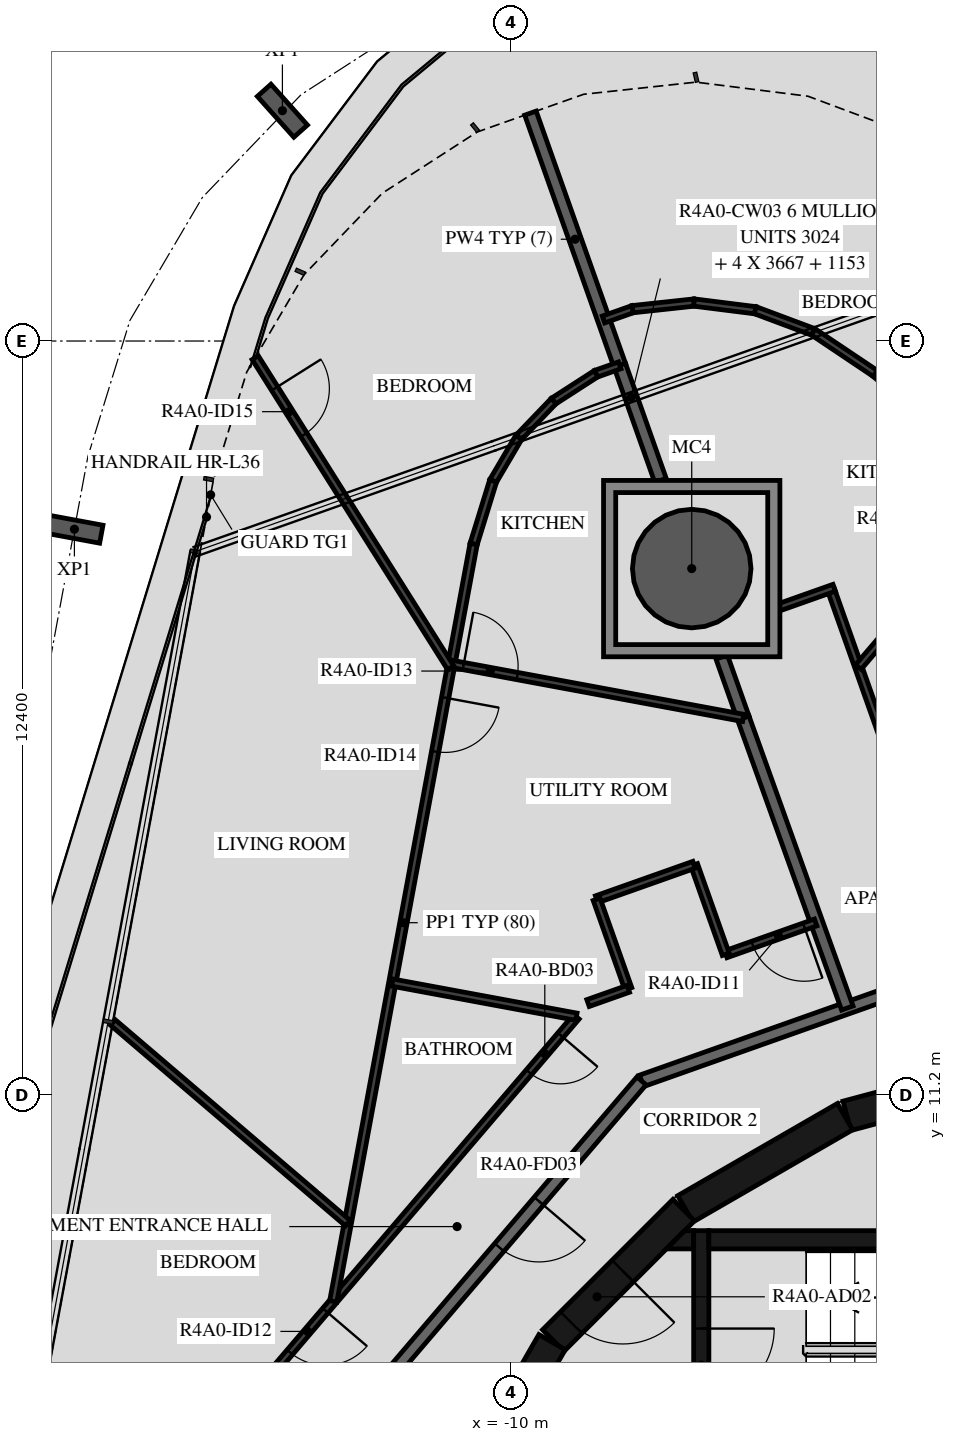
"""IFC4 building model, lengths in metres.
Left out: names, types, materials, properties, quantities, classifications, styles, units other than length and angle.
Written with IfcOpenShell. Run it as: python <this file> out.ifc"""

import sys

from ifc_helpers import new_model, si_unit, direction, frame, frame_2d, origin, origin_2d, place, context, subcontext, project, spatial, polyline, rectangle, hollow_circle, i_section, outline, extrude, element, fill, save


model = new_model("IFC4")
c1 = context("Model", 3, precision=1e-05, world=origin(), true_north=direction((0.0, 1.0)))
c2 = subcontext(c1, "Body", "Model", "MODEL_VIEW")
j1 = project(units=[si_unit("LENGTHUNIT", "METRE"), si_unit("PLANEANGLEUNIT", "RADIAN")], contexts=[c1])
p1 = place(None, origin())
s1 = spatial("IfcSite", under=j1, at=p1, CompositionType="ELEMENT")
p2 = place(p1, origin())
s2 = spatial("IfcBuilding", under=s1, at=p2, CompositionType="ELEMENT")
p3 = place(p2, frame((0.0, 0.0, 151.7)))
s3 = spatial("IfcBuildingStorey", under=s2, at=p3, CompositionType="ELEMENT", Elevation=151.7)
p4 = place(p3, frame((-7.032, 19.858, -0.45), z_axis=(0.0, 0.0, 1.0), x_axis=(1.0, 0.0, 0.0)))
e1 = element("IfcColumn", 1, at=p4, inside=s3, PredefinedType="COLUMN", context=c2, shape_type="SweptSolid", body=[
    extrude(hollow_circle(Radius=0.975, WallThickness=0.045, at=origin_2d()), origin(), (0.0, 0.0, 1.0), 3.57),
])
for number, where, z_axis, x_axis in (
    (2, (-13.763, 27.387, -0.45), (0.0, 0.0, 1.0), (0.746, 0.666, 0.0)),
    (3, (-17.184, 20.505, -0.45), (0.0, 0.0, 1.0), (0.182, 0.983, 0.0)),
):
    element("IfcColumn", number, at=place(p3, frame(where, z_axis=z_axis, x_axis=x_axis)), inside=s3, PredefinedType="COLUMN", context=c2, shape_type="SweptSolid", body=[
        extrude(i_section(OverallWidth=0.3, OverallDepth=0.9, WebThickness=0.019, FlangeThickness=0.035, FilletRadius=0.03, at=origin_2d()), origin(), (0.0, 0.0, 1.0), 3.57),
    ])
for number, where, z_axis, x_axis in (
    (4, (-1.55, 11.643, 0.0), (0.0, 0.0, 1.0), (-0.966, -0.259, 0.0)),
    (5, (-4.51, 10.845, 0.0), (0.0, 0.0, 1.0), (-0.866, -0.5, 0.0)),
):
    element("IfcWall", number, at=place(p3, frame(where, z_axis=z_axis, x_axis=x_axis)), inside=s3, PredefinedType="SHEAR", context=c2, shape_type="SweptSolid", body=[
        extrude(rectangle(XDim=3.033, YDim=0.5, at=frame_2d((1.516, 0.0))), origin(), (0.0, 0.0, 1.0), 3.12),
    ])
p5 = place(p3, frame((-7.164, 9.308, 0.0), z_axis=(0.0, 0.0, 1.0), x_axis=(-0.707106781187, -0.707106781187, 0.0)))
e6 = element("IfcWall", 6, at=p5, inside=s3, PredefinedType="SHEAR", context=c2, shape_type="SweptSolid", body=[
    extrude(rectangle(XDim=3.032, YDim=0.5, at=frame_2d((1.516, 0.0))), origin(), (0.0, 0.0, 1.0), 3.12),
])
p6 = place(p5, frame((1.416, 0.0, 0.0)))
e7 = element("IfcOpeningElement", 7, at=p6, cuts=e6, PredefinedType="OPENING", context=c2, shape_type="SweptSolid", body=[
    extrude(rectangle(XDim=1.2, YDim=2.1, at=frame_2d((0.6, 1.05))), frame((0.0, 0.26, 0.0), z_axis=(0.0, -1.0, 0.0), x_axis=(1.0, 0.0, 0.0)), (0.0, 0.0, 1.0), 0.52),
])
p7 = place(p3, frame((-9.329, 7.137, 0.0), z_axis=(0.0, 0.0, 1.0), x_axis=(-0.500087131594, -0.865975092491, 0.0)))
e8 = element("IfcWall", 8, at=p7, inside=s3, PredefinedType="SHEAR", context=c2, shape_type="SweptSolid", body=[
    extrude(rectangle(XDim=3.033, YDim=0.5, at=frame_2d((1.516, 0.0))), origin(), (0.0, 0.0, 1.0), 3.12),
])
p8 = place(p3, frame((-6.75, 8.82, 0.0), z_axis=(0.0, 0.0, 1.0), x_axis=(1.0, 0.0, 0.0)))
e9 = element("IfcWall", 9, at=p8, inside=s3, PredefinedType="SHEAR", context=c2, shape_type="SweptSolid", body=[
    extrude(rectangle(XDim=6.75, YDim=0.3, at=frame_2d((3.375, 0.0))), origin(), (0.0, 0.0, 1.0), 3.12),
])
p9 = place(p3, frame((-6.875, 8.97, 0.0), z_axis=(0.0, 0.0, 1.0), x_axis=(0.0, -1.0, 0.0)))
e10 = element("IfcWall", 10, at=p9, inside=s3, PredefinedType="SHEAR", context=c2, shape_type="SweptSolid", body=[
    extrude(rectangle(XDim=3.92, YDim=0.25, at=frame_2d((1.96, 0.0))), origin(), (0.0, 0.0, 1.0), 3.12),
])
p10 = place(p9, frame((1.61, 0.0, 0.0)))
e11 = element("IfcOpeningElement", 11, at=p10, cuts=e10, PredefinedType="OPENING", context=c2, shape_type="SweptSolid", body=[
    extrude(rectangle(XDim=1.2, YDim=2.1, at=frame_2d((0.6, 1.05))), frame((0.0, 0.135, 0.0), z_axis=(0.0, -1.0, 0.0), x_axis=(1.0, 0.0, 0.0)), (0.0, 0.0, 1.0), 0.27),
])
p11 = place(p3, origin())
e12 = element("IfcWall", 12, at=p11, inside=s3, PredefinedType="SHEAR", context=c2, shape_type="SweptSolid", body=[
    extrude(outline(polyline([(-7.148, 8.97), (-7.0, 8.97), (-7.0, 8.67), (-7.448, 8.67), (-7.148, 8.97)])), origin(), (0.0, 0.0, 1.0), 3.12),
])
p12 = place(p3, frame((-2.359, 13.38, 0.0), z_axis=(0.0, 0.0, 1.0), x_axis=(-0.942647529236, -0.333789807551, 0.0)))
e13 = element("IfcWall", 13, at=p12, inside=s3, PredefinedType="STANDARD", context=c2, shape_type="SweptSolid", body=[
    extrude(rectangle(XDim=5.833, YDim=0.2, at=frame_2d((2.917, 0.0))), origin(), (0.0, 0.0, 1.0), 3.12),
])
p13 = place(p3, frame((-7.858, 11.433, 0.0), z_axis=(0.0, 0.0, 1.0), x_axis=(-0.649440801937, -0.760412154545, 0.0)))
e14 = element("IfcWall", 14, at=p13, inside=s3, PredefinedType="STANDARD", context=c2, shape_type="SweptSolid", body=[
    extrude(rectangle(XDim=7.181, YDim=0.2, at=frame_2d((3.59, 0.0))), origin(), (0.0, 0.0, 1.0), 3.12),
])
p14 = place(p13, frame((2.6, 0.0, 0.0)))
e15 = element("IfcOpeningElement", 15, at=p14, cuts=e14, PredefinedType="OPENING", context=c2, shape_type="SweptSolid", body=[
    extrude(rectangle(XDim=1.0, YDim=2.1, at=frame_2d((0.5, 1.05))), frame((0.0, 0.11, 0.0), z_axis=(0.0, -1.0, 0.0), x_axis=(1.0, 0.0, 0.0)), (0.0, 0.0, 1.0), 0.22),
])
p15 = place(p3, frame((-6.185, 17.402, 0.0), z_axis=(0.0, 0.0, 1.0), x_axis=(0.337736730281, -0.941240618024, 0.0)))
e16 = element("IfcWall", 16, at=p15, inside=s3, PredefinedType="STANDARD", context=c2, shape_type="SweptSolid", body=[
    extrude(rectangle(XDim=5.068, YDim=0.2, at=frame_2d((2.534, 0.0))), origin(), (0.0, 0.0, 1.0), 3.12),
])
p16 = place(p3, frame((-6.539, 18.403, 0.0), z_axis=(0.0, 0.0, 1.0), x_axis=(0.333625806098, -0.942705585804, 0.0)))
e17 = element("IfcWall", 17, at=p16, inside=s3, PredefinedType="STANDARD", context=c2, shape_type="SweptSolid", body=[
    extrude(rectangle(XDim=1.062, YDim=0.2, at=frame_2d((0.531, 0.0))), origin(), (0.0, 0.0, 1.0), 3.12),
])
p17 = place(p3, frame((-9.684, 27.348, 0.0), z_axis=(0.0, 0.0, 1.0), x_axis=(0.333818381408, -0.942637410797, 0.0)))
e18 = element("IfcWall", 18, at=p17, inside=s3, PredefinedType="STANDARD", context=c2, shape_type="SweptSolid", body=[
    extrude(rectangle(XDim=4.4, YDim=0.2, at=frame_2d((2.2, 0.0))), origin(), (0.0, 0.0, 1.0), 3.12),
])
p18 = place(p3, frame((-8.216, 23.2, 0.0), z_axis=(0.0, 0.0, 1.0), x_axis=(0.333793117913, -0.942646357036, 0.0)))
e19 = element("IfcWall", 19, at=p18, inside=s3, PredefinedType="STANDARD", context=c2, shape_type="SweptSolid", body=[
    extrude(rectangle(XDim=2.008, YDim=0.2, at=frame_2d((1.004, 0.0))), origin(), (0.0, 0.0, 1.0), 3.12),
])
p19 = place(p3, frame((8.702, 12.206, 0.0), z_axis=(0.0, 0.0, 1.0), x_axis=(-0.760401313718, 0.649453494945, 0.0)))
e20 = element("IfcWall", 20, at=p19, inside=s3, PredefinedType="PARTITIONING", context=c2, shape_type="SweptSolid", body=[
    extrude(rectangle(XDim=16.724, YDim=0.12, at=frame_2d((8.362, 0.0))), origin(), (0.0, 0.0, 1.0), 3.12),
])
p20 = place(p19, frame((0.2, 0.0, 0.0)))
e21 = element("IfcOpeningElement", 21, at=p20, cuts=e20, PredefinedType="OPENING", context=c2, shape_type="SweptSolid", body=[
    extrude(rectangle(XDim=0.9, YDim=2.1, at=frame_2d((0.45, 1.05))), frame((0.0, 0.07, 0.0), z_axis=(0.0, -1.0, 0.0), x_axis=(1.0, 0.0, 0.0)), (0.0, 0.0, 1.0), 0.14),
])
p21 = place(p19, frame((7.099, 0.0, 0.0)))
e22 = element("IfcOpeningElement", 22, at=p21, cuts=e20, PredefinedType="OPENING", context=c2, shape_type="SweptSolid", body=[
    extrude(rectangle(XDim=0.9, YDim=2.1, at=frame_2d((0.45, 1.05))), frame((0.0, 0.07, 0.0), z_axis=(0.0, -1.0, 0.0), x_axis=(1.0, 0.0, 0.0)), (0.0, 0.0, 1.0), 0.14),
])
p22 = place(p3, frame((-3.048, 14.727, 0.0), z_axis=(0.0, 0.0, 1.0), x_axis=(-0.333811603187, 0.942639811157, 0.0)))
e23 = element("IfcWall", 23, at=p22, inside=s3, PredefinedType="PARTITIONING", context=c2, shape_type="SweptSolid", body=[
    extrude(rectangle(XDim=5.087, YDim=0.12, at=frame_2d((2.543, 0.0))), origin(), (0.0, 0.0, 1.0), 3.12),
])
p23 = place(p3, frame((-4.689, 19.542, 0.0), z_axis=(0.0, 0.0, 1.0), x_axis=(-0.942661851862, -0.33374935662, 0.0)))
e24 = element("IfcWall", 24, at=p23, inside=s3, PredefinedType="PARTITIONING", context=c2, shape_type="SweptSolid", body=[
    extrude(rectangle(XDim=1.017, YDim=0.12, at=frame_2d((0.508, 0.0))), origin(), (0.0, 0.0, 1.0), 3.12),
])
p24 = place(p3, frame((-1.79, 21.167, 0.0), z_axis=(0.0, 0.0, 1.0), x_axis=(-0.649427819186, -0.760423242456, 0.0)))
e25 = element("IfcWall", 25, at=p24, inside=s3, PredefinedType="PARTITIONING", context=c2, shape_type="SweptSolid", body=[
    extrude(rectangle(XDim=3.851, YDim=0.12, at=frame_2d((1.926, 0.0))), origin(), (0.0, 0.0, 1.0), 3.12),
])
p25 = place(p24, frame((0.2, 0.0, 0.0)))
e26 = element("IfcOpeningElement", 26, at=p25, cuts=e25, PredefinedType="OPENING", context=c2, shape_type="SweptSolid", body=[
    extrude(rectangle(XDim=0.9, YDim=2.1, at=frame_2d((0.45, 1.05))), frame((0.0, 0.07, 0.0), z_axis=(0.0, -1.0, 0.0), x_axis=(1.0, 0.0, 0.0)), (0.0, 0.0, 1.0), 0.14),
])
p26 = place(p3, frame((-8.483, 23.954, 0.0), z_axis=(0.0, 0.0, 1.0), x_axis=(0.942554725445, 0.334051776738, 0.0)))
e27 = element("IfcWall", 27, at=p26, inside=s3, PredefinedType="PARTITIONING", context=c2, shape_type="SweptSolid", body=[
    extrude(rectangle(XDim=0.508, YDim=0.12, at=frame_2d((0.254, 0.0))), origin(), (0.0, 0.0, 1.0), 3.12),
])
p27 = place(p3, frame((-8.004, 24.124, 0.0), z_axis=(0.0, 0.0, 1.0), x_axis=(0.994216064839, 0.107398400431, 0.0)))
e28 = element("IfcWall", 28, at=p27, inside=s3, PredefinedType="PARTITIONING", context=c2, shape_type="SweptSolid", body=[
    extrude(rectangle(XDim=1.016, YDim=0.12, at=frame_2d((0.508, 0.0))), origin(), (0.0, 0.0, 1.0), 3.12),
])
p28 = place(p3, frame((-6.994, 24.233, 0.0), z_axis=(0.0, 0.0, 1.0), x_axis=(0.992188875952, -0.124744676991, 0.0)))
e29 = element("IfcWall", 29, at=p28, inside=s3, PredefinedType="PARTITIONING", context=c2, shape_type="SweptSolid", body=[
    extrude(rectangle(XDim=1.016, YDim=0.12, at=frame_2d((0.508, 0.0))), origin(), (0.0, 0.0, 1.0), 3.12),
])
p29 = place(p3, frame((-5.986, 24.106, 0.0), z_axis=(0.0, 0.0, 1.0), x_axis=(0.936625084254, -0.350333343469, 0.0)))
e30 = element("IfcWall", 30, at=p29, inside=s3, PredefinedType="PARTITIONING", context=c2, shape_type="SweptSolid", body=[
    extrude(rectangle(XDim=1.016, YDim=0.12, at=frame_2d((0.508, 0.0))), origin(), (0.0, 0.0, 1.0), 3.12),
])
p30 = place(p3, frame((-5.034, 23.75, 0.0), z_axis=(0.0, 0.0, 1.0), x_axis=(0.83070096574, -0.556718874764, 0.0)))
e31 = element("IfcWall", 31, at=p30, inside=s3, PredefinedType="PARTITIONING", context=c2, shape_type="SweptSolid", body=[
    extrude(rectangle(XDim=1.227, YDim=0.12, at=frame_2d((0.614, 0.0))), origin(), (0.0, 0.0, 1.0), 3.12),
])
p31 = place(p3, frame((-4.993, 14.038, 0.0), z_axis=(0.0, 0.0, 1.0), x_axis=(-0.942685371668, -0.333682918418, 0.0)))
e32 = element("IfcWall", 32, at=p31, inside=s3, PredefinedType="PARTITIONING", context=c2, shape_type="SweptSolid", body=[
    extrude(rectangle(XDim=1.569, YDim=0.12, at=frame_2d((0.784, 0.0))), origin(), (0.0, 0.0, 1.0), 3.12),
])
p32 = place(p31, frame((0.2, 0.0, 0.0)))
e33 = element("IfcOpeningElement", 33, at=p32, cuts=e32, PredefinedType="OPENING", context=c2, shape_type="SweptSolid", body=[
    extrude(rectangle(XDim=0.9, YDim=2.1, at=frame_2d((0.45, 1.05))), frame((0.0, 0.07, 0.0), z_axis=(0.0, -1.0, 0.0), x_axis=(1.0, 0.0, 0.0)), (0.0, 0.0, 1.0), 0.14),
])
p33 = place(p3, frame((-6.472, 13.515, 0.0), z_axis=(0.0, 0.0, 1.0), x_axis=(-0.333809516424, 0.942640550127, 0.0)))
e34 = element("IfcWall", 34, at=p33, inside=s3, PredefinedType="PARTITIONING", context=c2, shape_type="SweptSolid", body=[
    extrude(rectangle(XDim=1.562, YDim=0.12, at=frame_2d((0.781, 0.0))), origin(), (0.0, 0.0, 1.0), 3.12),
])
p34 = place(p3, frame((-6.993, 14.987, 0.0), z_axis=(0.0, 0.0, 1.0), x_axis=(-0.942599915297, -0.33392424243, 0.0)))
e35 = element("IfcWall", 35, at=p34, inside=s3, PredefinedType="PARTITIONING", context=c2, shape_type="SweptSolid", body=[
    extrude(rectangle(XDim=1.7, YDim=0.12, at=frame_2d((0.85, 0.0))), origin(), (0.0, 0.0, 1.0), 3.12),
])
p35 = place(p3, frame((-8.596, 14.419, 0.0), z_axis=(0.0, 0.0, 1.0), x_axis=(0.333670576497, -0.942689740254, 0.0)))
e36 = element("IfcWall", 36, at=p35, inside=s3, PredefinedType="PARTITIONING", context=c2, shape_type="SweptSolid", body=[
    extrude(rectangle(XDim=1.562, YDim=0.12, at=frame_2d((0.781, 0.0))), origin(), (0.0, 0.0, 1.0), 3.12),
])
p36 = place(p3, frame((-8.075, 12.947, 0.0), z_axis=(0.0, 0.0, 1.0), x_axis=(-0.942649994227, -0.33378284615, 0.0)))
e37 = element("IfcWall", 37, at=p36, inside=s3, PredefinedType="PARTITIONING", context=c2, shape_type="SweptSolid", body=[
    extrude(rectangle(XDim=0.703, YDim=0.12, at=frame_2d((0.352, 0.0))), origin(), (0.0, 0.0, 1.0), 3.12),
])
p37 = place(p3, frame((-8.929, 12.488, 0.0), z_axis=(0.0, 0.0, 1.0), x_axis=(-0.64944646045, -0.760407321775, 0.0)))
e38 = element("IfcWall", 38, at=p37, inside=s3, PredefinedType="PARTITIONING", context=c2, shape_type="SweptSolid", body=[
    extrude(rectangle(XDim=7.69, YDim=0.12, at=frame_2d((3.845, 0.0))), origin(), (0.0, 0.0, 1.0), 3.12),
])
p38 = place(p37, frame((0.4, 0.0, 0.0)))
e39 = element("IfcOpeningElement", 39, at=p38, cuts=e38, PredefinedType="OPENING", context=c2, shape_type="SweptSolid", body=[
    extrude(rectangle(XDim=0.8, YDim=2.1, at=frame_2d((0.4, 1.05))), frame((0.0, 0.07, 0.0), z_axis=(0.0, -1.0, 0.0), x_axis=(1.0, 0.0, 0.0)), (0.0, 0.0, 1.0), 0.14),
])
p39 = place(p37, frame((6.356, 0.0, 0.0)))
e40 = element("IfcOpeningElement", 40, at=p39, cuts=e38, PredefinedType="OPENING", context=c2, shape_type="SweptSolid", body=[
    extrude(rectangle(XDim=0.9, YDim=2.1, at=frame_2d((0.45, 1.05))), frame((0.0, 0.07, 0.0), z_axis=(0.0, -1.0, 0.0), x_axis=(1.0, 0.0, 0.0)), (0.0, 0.0, 1.0), 0.14),
])
p40 = place(p3, frame((-8.216, 23.2, 0.0), z_axis=(0.0, 0.0, 1.0), x_axis=(-0.942565413363, -0.33402161836, 0.0)))
e41 = element("IfcWall", 41, at=p40, inside=s3, PredefinedType="PARTITIONING", context=c2, shape_type="SweptSolid", body=[
    extrude(rectangle(XDim=0.414, YDim=0.12, at=frame_2d((0.207, 0.0))), origin(), (0.0, 0.0, 1.0), 3.12),
])
for number, where, z_axis, x_axis in (
    (42, (-8.606, 23.062, 0.0), (0.0, 0.0, 1.0), (-0.84, -0.542, 0.0)),
    (43, (-9.303, 22.612, 0.0), (0.0, 0.0, 1.0), (-0.693, -0.721, 0.0)),
    (44, (-9.877, 22.014, 0.0), (0.0, 0.0, 1.0), (-0.508, -0.861, 0.0)),
):
    element("IfcWall", number, at=place(p3, frame(where, z_axis=z_axis, x_axis=x_axis)), inside=s3, PredefinedType="PARTITIONING", context=c2, shape_type="SweptSolid", body=[
        extrude(rectangle(XDim=0.829, YDim=0.12, at=frame_2d((0.415, 0.0))), origin(), (0.0, 0.0, 1.0), 3.12),
    ])
p41 = place(p3, frame((-10.298, 21.3, 0.0), z_axis=(0.0, 0.0, 1.0), x_axis=(-0.295127342945, -0.955457927617, 0.0)))
e45 = element("IfcWall", 45, at=p41, inside=s3, PredefinedType="PARTITIONING", context=c2, shape_type="SweptSolid", body=[
    extrude(rectangle(XDim=1.087, YDim=0.12, at=frame_2d((0.543, 0.0))), origin(), (0.0, 0.0, 1.0), 3.12),
])
p42 = place(p3, frame((-10.618, 20.262, 0.0), z_axis=(0.0, 0.0, 1.0), x_axis=(-0.182222468274, -0.983257327487, 0.0)))
e46 = element("IfcWall", 46, at=p42, inside=s3, PredefinedType="PARTITIONING", context=c2, shape_type="SweptSolid", body=[
    extrude(rectangle(XDim=12.667, YDim=0.12, at=frame_2d((6.333, 0.0))), origin(), (0.0, 0.0, 1.0), 3.12),
])
p43 = place(p42, frame((2.57, 0.0, 0.0)))
e47 = element("IfcOpeningElement", 47, at=p43, cuts=e46, PredefinedType="OPENING", context=c2, shape_type="SweptSolid", body=[
    extrude(rectangle(XDim=0.9, YDim=2.1, at=frame_2d((0.45, 1.05))), frame((0.0, 0.07, 0.0), z_axis=(0.0, -1.0, 0.0), x_axis=(1.0, 0.0, 0.0)), (0.0, 0.0, 1.0), 0.14),
])
p44 = place(p3, frame((-10.984, 18.291, 0.0), z_axis=(0.0, 0.0, 1.0), x_axis=(0.98324782266, -0.182273748068, 0.0)))
e48 = element("IfcWall", 48, at=p44, inside=s3, PredefinedType="PARTITIONING", context=c2, shape_type="SweptSolid", body=[
    extrude(rectangle(XDim=4.881, YDim=0.12, at=frame_2d((2.44, 0.0))), origin(), (0.0, 0.0, 1.0), 3.12),
])
p45 = place(p44, frame((0.2, 0.0, 0.0)))
e49 = element("IfcOpeningElement", 49, at=p45, cuts=e48, PredefinedType="OPENING", context=c2, shape_type="SweptSolid", body=[
    extrude(rectangle(XDim=0.9, YDim=2.1, at=frame_2d((0.45, 1.05))), frame((0.0, 0.07, 0.0), z_axis=(0.0, -1.0, 0.0), x_axis=(1.0, 0.0, 0.0)), (0.0, 0.0, 1.0), 0.14),
])
p46 = place(p3, frame((-14.211, 23.326, 0.0), z_axis=(0.0, 0.0, 1.0), x_axis=(0.533278244906, -0.845939899467, 0.0)))
e50 = element("IfcWall", 50, at=p46, inside=s3, PredefinedType="PARTITIONING", context=c2, shape_type="SweptSolid", body=[
    extrude(rectangle(XDim=6.029, YDim=0.12, at=frame_2d((3.014, 0.0))), origin(), (0.0, 0.0, 1.0), 3.12),
])
p47 = place(p46, frame((0.6, 0.0, 0.0)))
e51 = element("IfcOpeningElement", 51, at=p47, cuts=e50, PredefinedType="OPENING", context=c2, shape_type="SweptSolid", body=[
    extrude(rectangle(XDim=0.9, YDim=2.1, at=frame_2d((0.45, 1.05))), frame((0.0, 0.07, 0.0), z_axis=(0.0, -1.0, 0.0), x_axis=(1.0, 0.0, 0.0)), (0.0, 0.0, 1.0), 0.14),
])
p48 = place(p3, frame((-11.955, 13.049, 0.0), z_axis=(0.0, 0.0, 1.0), x_axis=(0.983247271586, -0.182276720725, 0.0)))
e52 = element("IfcWall", 52, at=p48, inside=s3, PredefinedType="PARTITIONING", context=c2, shape_type="SweptSolid", body=[
    extrude(rectangle(XDim=3.078, YDim=0.12, at=frame_2d((1.539, 0.0))), origin(), (0.0, 0.0, 1.0), 3.12),
])
p49 = place(p3, frame((-16.552, 12.394, 0.0), z_axis=(0.0, 0.0, 1.0), x_axis=(0.760425586578, -0.649425074414, 0.0)))
e53 = element("IfcWall", 53, at=p49, inside=s3, PredefinedType="PARTITIONING", context=c2, shape_type="SweptSolid", body=[
    extrude(rectangle(XDim=5.081, YDim=0.12, at=frame_2d((2.541, 0.0))), origin(), (0.0, 0.0, 1.0), 3.12),
])
p50 = place(p3, origin())
e54 = element("IfcWall", 54, at=p50, inside=s3, PredefinedType="STANDARD", context=c2, shape_type="SweptSolid", body=[
    extrude(outline(polyline([(-5.582, 21.308), (-5.582, 18.408), (-8.482, 18.408), (-8.482, 21.308), (-5.582, 21.308)]), holes=[polyline([(-8.282, 18.608), (-5.782, 18.608), (-5.782, 21.108), (-8.282, 21.108), (-8.282, 18.608)])]), origin(), (0.0, 0.0, 1.0), 3.12),
])
p51 = place(p10, origin())
e55 = element("IfcDoor", 55, at=p51, inside=s3, OperationType="SINGLE_SWING_LEFT", PredefinedType="DOOR", context=c2, shape_type="SweptSolid", body=[
    extrude(rectangle(XDim=1.2, YDim=2.1, at=frame_2d((0.6, 1.05))), frame((0.0, 0.025, 0.0), z_axis=(0.0, -1.0, 0.0), x_axis=(1.0, 0.0, 0.0)), (0.0, 0.0, 1.0), 0.05),
])
fill(e11, e55)
p52 = place(p6, origin())
e56 = element("IfcDoor", 56, at=p52, inside=s3, OperationType="SINGLE_SWING_RIGHT", PredefinedType="DOOR", context=c2, shape_type="SweptSolid", body=[
    extrude(rectangle(XDim=1.2, YDim=2.1, at=frame_2d((0.6, 1.05))), frame((0.0, 0.025, 0.0), z_axis=(0.0, -1.0, 0.0), x_axis=(1.0, 0.0, 0.0)), (0.0, 0.0, 1.0), 0.05),
])
fill(e7, e56)
p53 = place(p14, origin())
e57 = element("IfcDoor", 57, at=p53, inside=s3, OperationType="SINGLE_SWING_LEFT", PredefinedType="DOOR", context=c2, shape_type="SweptSolid", body=[
    extrude(rectangle(XDim=1.0, YDim=2.1, at=frame_2d((0.5, 1.05))), frame((0.0, 0.025, 0.0), z_axis=(0.0, -1.0, 0.0), x_axis=(1.0, 0.0, 0.0)), (0.0, 0.0, 1.0), 0.05),
])
fill(e15, e57)
p54 = place(p32, origin())
e58 = element("IfcDoor", 58, at=p54, inside=s3, OperationType="SINGLE_SWING_LEFT", PredefinedType="DOOR", context=c2, shape_type="SweptSolid", body=[
    extrude(rectangle(XDim=0.9, YDim=2.1, at=frame_2d((0.45, 1.05))), frame((0.0, 0.025, 0.0), z_axis=(0.0, -1.0, 0.0), x_axis=(1.0, 0.0, 0.0)), (0.0, 0.0, 1.0), 0.05),
])
fill(e33, e58)
p55 = place(p38, origin())
e59 = element("IfcDoor", 59, at=p55, inside=s3, OperationType="SINGLE_SWING_LEFT", PredefinedType="DOOR", context=c2, shape_type="SweptSolid", body=[
    extrude(rectangle(XDim=0.8, YDim=2.1, at=frame_2d((0.4, 1.05))), frame((0.0, 0.025, 0.0), z_axis=(0.0, -1.0, 0.0), x_axis=(1.0, 0.0, 0.0)), (0.0, 0.0, 1.0), 0.05),
])
fill(e39, e59)
p56 = place(p39, origin())
e60 = element("IfcDoor", 60, at=p56, inside=s3, OperationType="SINGLE_SWING_LEFT", PredefinedType="DOOR", context=c2, shape_type="SweptSolid", body=[
    extrude(rectangle(XDim=0.9, YDim=2.1, at=frame_2d((0.45, 1.05))), frame((0.0, 0.025, 0.0), z_axis=(0.0, -1.0, 0.0), x_axis=(1.0, 0.0, 0.0)), (0.0, 0.0, 1.0), 0.05),
])
fill(e40, e60)
p57 = place(p45, origin())
e61 = element("IfcDoor", 61, at=p57, inside=s3, OperationType="SINGLE_SWING_LEFT", PredefinedType="DOOR", context=c2, shape_type="SweptSolid", body=[
    extrude(rectangle(XDim=0.9, YDim=2.1, at=frame_2d((0.45, 1.05))), frame((0.0, 0.025, 0.0), z_axis=(0.0, -1.0, 0.0), x_axis=(1.0, 0.0, 0.0)), (0.0, 0.0, 1.0), 0.05),
])
fill(e49, e61)
p58 = place(p43, origin())
e62 = element("IfcDoor", 62, at=p58, inside=s3, OperationType="SINGLE_SWING_LEFT", PredefinedType="DOOR", context=c2, shape_type="SweptSolid", body=[
    extrude(rectangle(XDim=0.9, YDim=2.1, at=frame_2d((0.45, 1.05))), frame((0.0, 0.025, 0.0), z_axis=(0.0, -1.0, 0.0), x_axis=(1.0, 0.0, 0.0)), (0.0, 0.0, 1.0), 0.05),
])
fill(e47, e62)
p59 = place(p47, origin())
e63 = element("IfcDoor", 63, at=p59, inside=s3, OperationType="SINGLE_SWING_LEFT", PredefinedType="DOOR", context=c2, shape_type="SweptSolid", body=[
    extrude(rectangle(XDim=0.9, YDim=2.1, at=frame_2d((0.45, 1.05))), frame((0.0, 0.025, 0.0), z_axis=(0.0, -1.0, 0.0), x_axis=(1.0, 0.0, 0.0)), (0.0, 0.0, 1.0), 0.05),
])
fill(e51, e63)
save(model, sys.argv[1])
